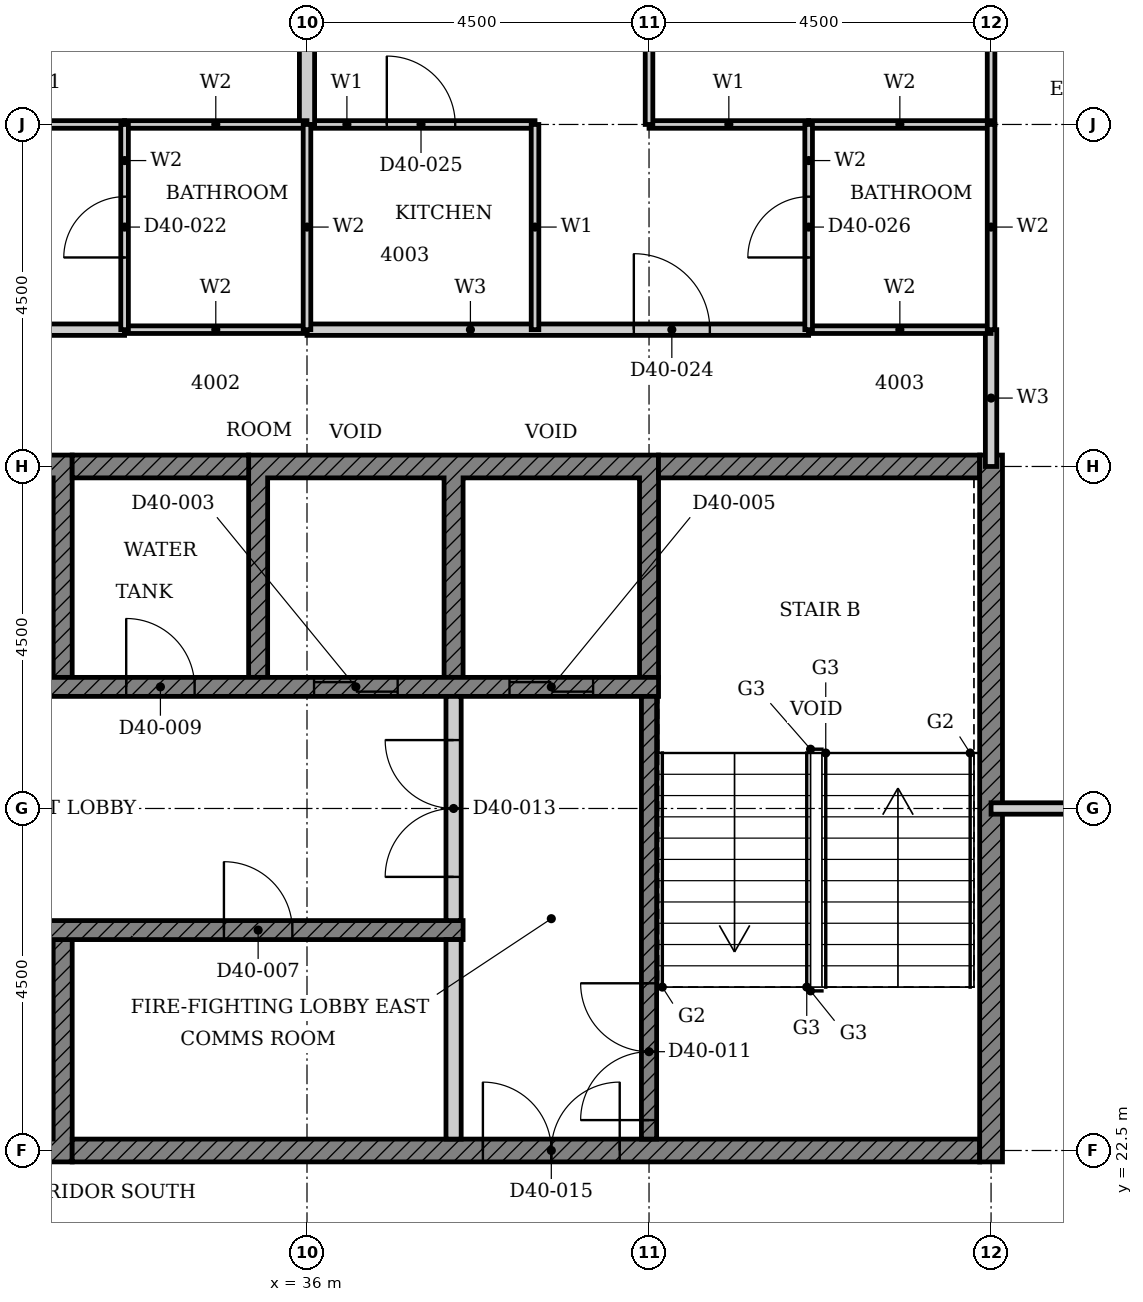
"""IFC4 building model, lengths in metres.
Left out: names, types, materials, properties, quantities, classifications, styles, units other than length and angle.
Written with IfcOpenShell. Run it as: python <this file> out.ifc"""

import sys

from ifc_helpers import new_model, si_unit, direction, frame, frame_2d, origin, place, context, subcontext, project, spatial, polyline, rectangle, outline, extrude, element, fill, save


model = new_model("IFC4")
c1 = context("Model", 3, precision=1e-05, world=origin(), true_north=direction((0.0, 1.0)))
c2 = subcontext(c1, "Body", "Model", "MODEL_VIEW")
j1 = project(units=[si_unit("LENGTHUNIT", "METRE"), si_unit("PLANEANGLEUNIT", "RADIAN")], contexts=[c1])
p1 = place(None, origin())
s1 = spatial("IfcSite", under=j1, at=p1, CompositionType="ELEMENT")
p2 = place(p1, origin())
s2 = spatial("IfcBuilding", under=s1, at=p2, CompositionType="ELEMENT")
p3 = place(p2, frame((0.0, 0.0, 161.7)))
s3 = spatial("IfcBuildingStorey", under=s2, at=p3, CompositionType="ELEMENT", Elevation=161.7)
p4 = place(p3, origin())
e1 = element("IfcWall", 1, at=p4, inside=s3, PredefinedType="SHEAR", context=c2, shape_type="SweptSolid", body=[
    extrude(outline(polyline([(27.518, 22.35), (32.911, 22.35), (32.911, 25.275), (32.661, 25.275), (32.661, 22.65), (30.339, 22.65), (30.339, 25.275), (30.089, 25.275), (30.089, 22.65), (27.768, 22.65), (27.768, 25.275), (27.518, 25.275), (27.518, 22.35)])), origin(), (0.0, 0.0, 1.0), 3.4),
])
p5 = place(p3, origin())
e2 = element("IfcWall", 2, at=p5, inside=s3, PredefinedType="SHEAR", context=c2, shape_type="SweptSolid", body=[
    extrude(outline(polyline([(27.518, 28.725), (27.768, 28.725), (27.768, 31.35), (30.089, 31.35), (30.089, 28.725), (30.339, 28.725), (30.339, 31.35), (32.661, 31.35), (32.661, 28.725), (32.911, 28.725), (32.911, 31.65), (27.518, 31.65), (27.518, 28.725)])), origin(), (0.0, 0.0, 1.0), 3.4),
])
p6 = place(p3, origin())
e3 = element("IfcWall", 3, at=p6, inside=s3, PredefinedType="SHEAR", context=c2, shape_type="SweptSolid", body=[
    extrude(outline(polyline([(35.232, 28.725), (35.482, 28.725), (35.482, 31.35), (37.803, 31.35), (37.803, 28.725), (38.053, 28.725), (38.053, 31.35), (40.375, 31.35), (40.375, 28.725), (40.625, 28.725), (40.625, 31.65), (35.232, 31.65), (35.232, 28.725)])), origin(), (0.0, 0.0, 1.0), 3.4),
])
p7 = place(p3, frame((32.911, 22.5, 0.0), z_axis=(0.0, 0.0, 1.0), x_axis=(1.0, 0.0, 0.0)))
e4 = element("IfcWall", 4, at=p7, inside=s3, PredefinedType="SHEAR", context=c2, shape_type="SweptSolid", body=[
    extrude(rectangle(XDim=11.939, YDim=0.3, at=frame_2d((5.97, 0.0))), origin(), (0.0, 0.0, 1.0), 3.4),
])
p8 = place(p7, frame((5.404, 0.0, 0.0)))
e5 = element("IfcOpeningElement", 5, at=p8, cuts=e4, PredefinedType="OPENING", context=c2, shape_type="SweptSolid", body=[
    extrude(rectangle(XDim=1.8, YDim=2.1, at=frame_2d((0.9, 1.05))), frame((0.0, 0.16, 0.0), z_axis=(0.0, -1.0, 0.0), x_axis=(1.0, 0.0, 0.0)), (0.0, 0.0, 1.0), 0.32),
])
p9 = place(p3, frame((32.911, 31.5, 0.0), z_axis=(0.0, 0.0, 1.0), x_axis=(1.0, 0.0, 0.0)))
e6 = element("IfcWall", 6, at=p9, inside=s3, PredefinedType="SHEAR", context=c2, shape_type="SweptSolid", body=[
    extrude(rectangle(XDim=2.322, YDim=0.3, at=frame_2d((1.161, 0.0))), origin(), (0.0, 0.0, 1.0), 3.4),
])
p10 = place(p3, frame((40.625, 31.5, 0.0), z_axis=(0.0, 0.0, 1.0), x_axis=(1.0, 0.0, 0.0)))
e7 = element("IfcWall", 7, at=p10, inside=s3, PredefinedType="SHEAR", context=c2, shape_type="SweptSolid", body=[
    extrude(rectangle(XDim=4.225, YDim=0.3, at=frame_2d((2.113, 0.0))), origin(), (0.0, 0.0, 1.0), 3.4),
])
p11 = place(p3, frame((45.0, 22.35, 0.0), z_axis=(0.0, 0.0, 1.0), x_axis=(0.0, 1.0, 0.0)))
e8 = element("IfcWall", 8, at=p11, inside=s3, PredefinedType="SHEAR", context=c2, shape_type="SweptSolid", body=[
    extrude(rectangle(XDim=9.3, YDim=0.3, at=frame_2d((4.65, 0.0))), origin(), (0.0, 0.0, 1.0), 3.4),
])
p12 = place(p3, frame((22.375, 25.4, 0.0), z_axis=(0.0, 0.0, 1.0), x_axis=(1.0, 0.0, 0.0)))
e9 = element("IfcWall", 9, at=p12, inside=s3, PredefinedType="SHEAR", context=c2, shape_type="SweptSolid", body=[
    extrude(rectangle(XDim=15.678, YDim=0.25, at=frame_2d((7.839, 0.0))), origin(), (0.0, 0.0, 1.0), 3.4),
])
p13 = place(p12, frame((8.575, 0.0, 0.0)))
e10 = element("IfcOpeningElement", 10, at=p13, cuts=e9, PredefinedType="OPENING", context=c2, shape_type="SweptSolid", body=[
    extrude(rectangle(XDim=1.1, YDim=2.1, at=frame_2d((0.55, 1.05))), frame((0.0, 0.135, 0.0), z_axis=(0.0, -1.0, 0.0), x_axis=(1.0, 0.0, 0.0)), (0.0, 0.0, 1.0), 0.27),
])
p14 = place(p12, frame((0.861, 0.0, 0.0)))
e11 = element("IfcOpeningElement", 11, at=p14, cuts=e9, PredefinedType="OPENING", context=c2, shape_type="SweptSolid", body=[
    extrude(rectangle(XDim=1.1, YDim=2.1, at=frame_2d((0.55, 1.05))), frame((0.0, 0.135, 0.0), z_axis=(0.0, -1.0, 0.0), x_axis=(1.0, 0.0, 0.0)), (0.0, 0.0, 1.0), 0.27),
])
p15 = place(p12, frame((3.532, 0.0, 0.0)))
e12 = element("IfcOpeningElement", 12, at=p15, cuts=e9, PredefinedType="OPENING", context=c2, shape_type="SweptSolid", body=[
    extrude(rectangle(XDim=0.9, YDim=2.1, at=frame_2d((0.45, 1.05))), frame((0.0, 0.135, 0.0), z_axis=(0.0, -1.0, 0.0), x_axis=(1.0, 0.0, 0.0)), (0.0, 0.0, 1.0), 0.27),
])
p16 = place(p12, frame((12.532, 0.0, 0.0)))
e13 = element("IfcOpeningElement", 13, at=p16, cuts=e9, PredefinedType="OPENING", context=c2, shape_type="SweptSolid", body=[
    extrude(rectangle(XDim=0.9, YDim=2.1, at=frame_2d((0.45, 1.05))), frame((0.0, 0.135, 0.0), z_axis=(0.0, -1.0, 0.0), x_axis=(1.0, 0.0, 0.0)), (0.0, 0.0, 1.0), 0.27),
])
p17 = place(p3, frame((24.947, 28.6, 0.0), z_axis=(0.0, 0.0, 1.0), x_axis=(1.0, 0.0, 0.0)))
e14 = element("IfcWall", 14, at=p17, inside=s3, PredefinedType="SHEAR", context=c2, shape_type="SweptSolid", body=[
    extrude(rectangle(XDim=15.678, YDim=0.25, at=frame_2d((7.839, 0.0))), origin(), (0.0, 0.0, 1.0), 3.4),
])
p18 = place(p17, frame((6.004, 0.0, 0.0)))
e15 = element("IfcOpeningElement", 15, at=p18, cuts=e14, PredefinedType="OPENING", context=c2, shape_type="SweptSolid", body=[
    extrude(rectangle(XDim=1.1, YDim=2.1, at=frame_2d((0.55, 1.05))), frame((0.0, 0.135, 0.0), z_axis=(0.0, -1.0, 0.0), x_axis=(1.0, 0.0, 0.0)), (0.0, 0.0, 1.0), 0.27),
])
p19 = place(p17, frame((11.146, 0.0, 0.0)))
e16 = element("IfcOpeningElement", 16, at=p19, cuts=e14, PredefinedType="OPENING", context=c2, shape_type="SweptSolid", body=[
    extrude(rectangle(XDim=1.1, YDim=2.1, at=frame_2d((0.55, 1.05))), frame((0.0, 0.135, 0.0), z_axis=(0.0, -1.0, 0.0), x_axis=(1.0, 0.0, 0.0)), (0.0, 0.0, 1.0), 0.27),
])
p20 = place(p17, frame((13.718, 0.0, 0.0)))
e17 = element("IfcOpeningElement", 17, at=p20, cuts=e14, PredefinedType="OPENING", context=c2, shape_type="SweptSolid", body=[
    extrude(rectangle(XDim=1.1, YDim=2.1, at=frame_2d((0.55, 1.05))), frame((0.0, 0.135, 0.0), z_axis=(0.0, -1.0, 0.0), x_axis=(1.0, 0.0, 0.0)), (0.0, 0.0, 1.0), 0.27),
])
p21 = place(p17, frame((0.961, 0.0, 0.0)))
e18 = element("IfcOpeningElement", 18, at=p21, cuts=e14, PredefinedType="OPENING", context=c2, shape_type="SweptSolid", body=[
    extrude(rectangle(XDim=0.9, YDim=2.1, at=frame_2d((0.45, 1.05))), frame((0.0, 0.135, 0.0), z_axis=(0.0, -1.0, 0.0), x_axis=(1.0, 0.0, 0.0)), (0.0, 0.0, 1.0), 0.27),
])
p22 = place(p17, frame((8.675, 0.0, 0.0)))
e19 = element("IfcOpeningElement", 19, at=p22, cuts=e14, PredefinedType="OPENING", context=c2, shape_type="SweptSolid", body=[
    extrude(rectangle(XDim=0.9, YDim=2.1, at=frame_2d((0.45, 1.05))), frame((0.0, 0.135, 0.0), z_axis=(0.0, -1.0, 0.0), x_axis=(1.0, 0.0, 0.0)), (0.0, 0.0, 1.0), 0.27),
])
p23 = place(p3, frame((37.928, 22.65, 0.0), z_axis=(0.0, 0.0, 1.0), x_axis=(0.0, 1.0, 0.0)))
e20 = element("IfcWall", 20, at=p23, inside=s3, PredefinedType="PARTITIONING", context=c2, shape_type="SweptSolid", body=[
    extrude(rectangle(XDim=2.625, YDim=0.2, at=frame_2d((1.312, 0.0))), origin(), (0.0, 0.0, 1.0), 3.4),
])
p24 = place(p3, frame((40.5, 22.65, 0.0), z_axis=(0.0, 0.0, 1.0), x_axis=(0.0, 1.0, 0.0)))
e21 = element("IfcWall", 21, at=p24, inside=s3, PredefinedType="SHEAR", context=c2, shape_type="SweptSolid", body=[
    extrude(rectangle(XDim=5.825, YDim=0.2, at=frame_2d((2.913, 0.0))), origin(), (0.0, 0.0, 1.0), 3.4),
])
p25 = place(p24, frame((0.25, 0.0, 0.0)))
e22 = element("IfcOpeningElement", 22, at=p25, cuts=e21, PredefinedType="OPENING", context=c2, shape_type="SweptSolid", body=[
    extrude(rectangle(XDim=1.8, YDim=2.1, at=frame_2d((0.9, 1.05))), frame((0.0, 0.11, 0.0), z_axis=(0.0, -1.0, 0.0), x_axis=(1.0, 0.0, 0.0)), (0.0, 0.0, 1.0), 0.22),
])
p26 = place(p3, frame((37.928, 25.525, 0.0), z_axis=(0.0, 0.0, 1.0), x_axis=(0.0, 1.0, 0.0)))
e23 = element("IfcWall", 23, at=p26, inside=s3, PredefinedType="PARTITIONING", context=c2, shape_type="SweptSolid", body=[
    extrude(rectangle(XDim=2.95, YDim=0.2, at=frame_2d((1.475, 0.0))), origin(), (0.0, 0.0, 1.0), 3.4),
])
p27 = place(p26, frame((0.575, 0.0, 0.0)))
e24 = element("IfcOpeningElement", 24, at=p27, cuts=e23, PredefinedType="OPENING", context=c2, shape_type="SweptSolid", body=[
    extrude(rectangle(XDim=1.8, YDim=2.1, at=frame_2d((0.9, 1.05))), frame((0.0, 0.11, 0.0), z_axis=(0.0, -1.0, 0.0), x_axis=(1.0, 0.0, 0.0)), (0.0, 0.0, 1.0), 0.22),
])
p28 = place(p3, frame((45.0, 27.0, 0.0), z_axis=(0.0, 0.0, 1.0), x_axis=(1.0, 0.0, 0.0)))
e25 = element("IfcWall", 25, at=p28, inside=s3, PredefinedType="PARTITIONING", context=c2, shape_type="SweptSolid", body=[
    extrude(rectangle(XDim=13.5, YDim=0.15, at=frame_2d((6.75, 0.0))), origin(), (0.0, 0.0, 1.0), 2.68),
])
p29 = place(p28, frame((7.15, 0.0, 0.0)))
e26 = element("IfcOpeningElement", 26, at=p29, cuts=e25, PredefinedType="OPENING", context=c2, shape_type="SweptSolid", body=[
    extrude(rectangle(XDim=1.0, YDim=2.1, at=frame_2d((0.5, 1.05))), frame((0.0, 0.085, 0.0), z_axis=(0.0, -1.0, 0.0), x_axis=(1.0, 0.0, 0.0)), (0.0, 0.0, 1.0), 0.17),
])
p30 = place(p3, frame((27.0, 33.3, 0.0), z_axis=(0.0, 0.0, 1.0), x_axis=(1.0, 0.0, 0.0)))
e27 = element("IfcWall", 27, at=p30, inside=s3, PredefinedType="PARTITIONING", context=c2, shape_type="SweptSolid", body=[
    extrude(rectangle(XDim=6.6, YDim=0.15, at=frame_2d((3.3, 0.0))), origin(), (0.0, 0.0, 1.0), 3.4),
])
p31 = place(p30, frame((4.3, 0.0, 0.0)))
e28 = element("IfcOpeningElement", 28, at=p31, cuts=e27, PredefinedType="OPENING", context=c2, shape_type="SweptSolid", body=[
    extrude(rectangle(XDim=1.0, YDim=2.2, at=frame_2d((0.5, 1.1))), frame((0.0, 0.085, 0.0), z_axis=(0.0, -1.0, 0.0), x_axis=(1.0, 0.0, 0.0)), (0.0, 0.0, 1.0), 0.17),
])
p32 = place(p3, frame((36.0, 33.3, 0.0), z_axis=(0.0, 0.0, 1.0), x_axis=(1.0, 0.0, 0.0)))
e29 = element("IfcWall", 29, at=p32, inside=s3, PredefinedType="PARTITIONING", context=c2, shape_type="SweptSolid", body=[
    extrude(rectangle(XDim=6.6, YDim=0.15, at=frame_2d((3.3, 0.0))), origin(), (0.0, 0.0, 1.0), 3.4),
])
p33 = place(p32, frame((4.3, 0.0, 0.0)))
e30 = element("IfcOpeningElement", 30, at=p33, cuts=e29, PredefinedType="OPENING", context=c2, shape_type="SweptSolid", body=[
    extrude(rectangle(XDim=1.0, YDim=2.2, at=frame_2d((0.5, 1.1))), frame((0.0, 0.085, 0.0), z_axis=(0.0, -1.0, 0.0), x_axis=(1.0, 0.0, 0.0)), (0.0, 0.0, 1.0), 0.17),
])
p34 = place(p3, frame((45.0, 31.5, 0.0), z_axis=(0.0, 0.0, 1.0), x_axis=(0.0, 1.0, 0.0)))
e31 = element("IfcWall", 31, at=p34, inside=s3, PredefinedType="PARTITIONING", context=c2, shape_type="SweptSolid", body=[
    extrude(rectangle(XDim=1.8, YDim=0.15, at=frame_2d((0.9, 0.0))), origin(), (0.0, 0.0, 1.0), 3.4),
])
for number, where, z_axis, x_axis in (
    (32, (31.5, 36.0, 0.0), (0.0, 0.0, 1.0), (1.0, 0.0, 0.0)),
    (33, (40.5, 36.0, 0.0), (0.0, 0.0, 1.0), (1.0, 0.0, 0.0)),
):
    element("IfcWall", number, at=place(p3, frame(where, z_axis=z_axis, x_axis=x_axis)), inside=s3, PredefinedType="PARTITIONING", context=c2, shape_type="SweptSolid", body=[
        extrude(rectangle(XDim=2.1, YDim=0.1, at=frame_2d((1.05, 0.0))), origin(), (0.0, 0.0, 1.0), 3.4),
    ])
p35 = place(p3, frame((36.0, 36.0, 0.0), z_axis=(0.0, 0.0, 1.0), x_axis=(1.0, 0.0, 0.0)))
e34 = element("IfcWall", 34, at=p35, inside=s3, PredefinedType="PARTITIONING", context=c2, shape_type="SweptSolid", body=[
    extrude(rectangle(XDim=3.0, YDim=0.1, at=frame_2d((1.5, 0.0))), origin(), (0.0, 0.0, 1.0), 3.4),
])
p36 = place(p35, frame((1.05, 0.0, 0.0)))
e35 = element("IfcOpeningElement", 35, at=p36, cuts=e34, PredefinedType="OPENING", context=c2, shape_type="SweptSolid", body=[
    extrude(rectangle(XDim=0.9, YDim=2.1, at=frame_2d((0.45, 1.05))), frame((0.0, 0.06, 0.0), z_axis=(0.0, -1.0, 0.0), x_axis=(1.0, 0.0, 0.0)), (0.0, 0.0, 1.0), 0.12),
])
p37 = place(p3, frame((39.0, 33.3, 0.0), z_axis=(0.0, 0.0, 1.0), x_axis=(0.0, 1.0, 0.0)))
e36 = element("IfcWall", 36, at=p37, inside=s3, PredefinedType="PARTITIONING", context=c2, shape_type="SweptSolid", body=[
    extrude(rectangle(XDim=2.7, YDim=0.1, at=frame_2d((1.35, 0.0))), origin(), (0.0, 0.0, 1.0), 3.4),
])
p38 = place(p3, frame((40.5, 36.0, 0.0), z_axis=(0.0, 0.0, 1.0), x_axis=(0.0, 1.0, 0.0)))
e37 = element("IfcWall", 37, at=p38, inside=s3, PredefinedType="PARTITIONING", context=c2, shape_type="SweptSolid", body=[
    extrude(rectangle(XDim=4.84, YDim=0.1, at=frame_2d((2.42, 0.0))), origin(), (0.0, 0.0, 1.0), 3.4),
])
p39 = place(p38, frame((1.8, 0.0, 0.0)))
e38 = element("IfcOpeningElement", 38, at=p39, cuts=e37, PredefinedType="OPENING", context=c2, shape_type="SweptSolid", body=[
    extrude(rectangle(XDim=0.9, YDim=2.1, at=frame_2d((0.45, 1.05))), frame((0.0, 0.06, 0.0), z_axis=(0.0, -1.0, 0.0), x_axis=(1.0, 0.0, 0.0)), (0.0, 0.0, 1.0), 0.12),
])
p40 = place(p3, frame((45.0, 36.001, 0.0), z_axis=(0.0, 0.0, 1.0), x_axis=(0.0, 1.0, 0.0)))
e39 = element("IfcWall", 39, at=p40, inside=s3, PredefinedType="PARTITIONING", context=c2, shape_type="SweptSolid", body=[
    extrude(rectangle(XDim=2.439, YDim=0.1, at=frame_2d((1.219, 0.0))), origin(), (0.0, 0.0, 1.0), 3.4),
])
p41 = place(p3, frame((36.0, 36.0, 0.0), z_axis=(0.0, 0.0, 1.0), x_axis=(0.0, 1.0, 0.0)))
e40 = element("IfcWall", 40, at=p41, inside=s3, PredefinedType="PARTITIONING", context=c2, shape_type="SweptSolid", body=[
    extrude(rectangle(XDim=4.69, YDim=0.2, at=frame_2d((2.345, 0.0))), origin(), (0.0, 0.0, 1.0), 3.4),
])
for number, where, z_axis, x_axis in (
    (41, (33.6, 33.3, 0.0), (0.0, 0.0, 1.0), (1.0, 0.0, 0.0)),
    (42, (42.6, 33.3, 0.0), (0.0, 0.0, 1.0), (1.0, 0.0, 0.0)),
    (43, (33.6, 36.0, 0.0), (0.0, 0.0, 1.0), (1.0, 0.0, 0.0)),
    (44, (42.6, 36.0, 0.0), (0.0, 0.0, 1.0), (1.0, 0.0, 0.0)),
):
    element("IfcWall", number, at=place(p3, frame(where, z_axis=z_axis, x_axis=x_axis)), inside=s3, PredefinedType="PARTITIONING", context=c2, shape_type="SweptSolid", body=[
        extrude(rectangle(XDim=2.4, YDim=0.1, at=frame_2d((1.2, 0.0))), origin(), (0.0, 0.0, 1.0), 3.4),
    ])
p42 = place(p3, frame((33.6, 33.3, 0.0), z_axis=(0.0, 0.0, 1.0), x_axis=(0.0, 1.0, 0.0)))
e45 = element("IfcWall", 45, at=p42, inside=s3, PredefinedType="PARTITIONING", context=c2, shape_type="SweptSolid", body=[
    extrude(rectangle(XDim=2.7, YDim=0.1, at=frame_2d((1.35, 0.0))), origin(), (0.0, 0.0, 1.0), 3.4),
])
p43 = place(p42, frame((0.95, 0.0, 0.0)))
e46 = element("IfcOpeningElement", 46, at=p43, cuts=e45, PredefinedType="OPENING", context=c2, shape_type="SweptSolid", body=[
    extrude(rectangle(XDim=0.8, YDim=2.1, at=frame_2d((0.4, 1.05))), frame((0.0, 0.06, 0.0), z_axis=(0.0, -1.0, 0.0), x_axis=(1.0, 0.0, 0.0)), (0.0, 0.0, 1.0), 0.12),
])
p44 = place(p3, frame((36.0, 33.3, 0.0), z_axis=(0.0, 0.0, 1.0), x_axis=(0.0, 1.0, 0.0)))
e47 = element("IfcWall", 47, at=p44, inside=s3, PredefinedType="PARTITIONING", context=c2, shape_type="SweptSolid", body=[
    extrude(rectangle(XDim=2.7, YDim=0.1, at=frame_2d((1.35, 0.0))), origin(), (0.0, 0.0, 1.0), 3.4),
])
p45 = place(p3, frame((42.6, 33.3, 0.0), z_axis=(0.0, 0.0, 1.0), x_axis=(0.0, 1.0, 0.0)))
e48 = element("IfcWall", 48, at=p45, inside=s3, PredefinedType="PARTITIONING", context=c2, shape_type="SweptSolid", body=[
    extrude(rectangle(XDim=2.7, YDim=0.1, at=frame_2d((1.35, 0.0))), origin(), (0.0, 0.0, 1.0), 3.4),
])
p46 = place(p45, frame((0.95, 0.0, 0.0)))
e49 = element("IfcOpeningElement", 49, at=p46, cuts=e48, PredefinedType="OPENING", context=c2, shape_type="SweptSolid", body=[
    extrude(rectangle(XDim=0.8, YDim=2.1, at=frame_2d((0.4, 1.05))), frame((0.0, 0.06, 0.0), z_axis=(0.0, -1.0, 0.0), x_axis=(1.0, 0.0, 0.0)), (0.0, 0.0, 1.0), 0.12),
])
p47 = place(p3, frame((45.0, 33.3, 0.0), z_axis=(0.0, 0.0, 1.0), x_axis=(0.0, 1.0, 0.0)))
e50 = element("IfcWall", 50, at=p47, inside=s3, PredefinedType="PARTITIONING", context=c2, shape_type="SweptSolid", body=[
    extrude(rectangle(XDim=2.7, YDim=0.1, at=frame_2d((1.35, 0.0))), origin(), (0.0, 0.0, 1.0), 3.4),
])
p48 = place(p19, origin())
e51 = element("IfcDoor", 51, at=p48, inside=s3, OperationType="DOUBLE_DOOR_SLIDING", PredefinedType="DOOR", context=c2, shape_type="SweptSolid", body=[
    extrude(rectangle(XDim=1.1, YDim=2.1, at=frame_2d((0.55, 1.05))), frame((0.0, 0.025, 0.0), z_axis=(0.0, -1.0, 0.0), x_axis=(1.0, 0.0, 0.0)), (0.0, 0.0, 1.0), 0.05),
])
fill(e16, e51)
p49 = place(p20, origin())
e52 = element("IfcDoor", 52, at=p49, inside=s3, OperationType="DOUBLE_DOOR_SLIDING", PredefinedType="DOOR", context=c2, shape_type="SweptSolid", body=[
    extrude(rectangle(XDim=1.1, YDim=2.1, at=frame_2d((0.55, 1.05))), frame((0.0, 0.025, 0.0), z_axis=(0.0, -1.0, 0.0), x_axis=(1.0, 0.0, 0.0)), (0.0, 0.0, 1.0), 0.05),
])
fill(e17, e52)
p50 = place(p16, origin())
e53 = element("IfcDoor", 53, at=p50, inside=s3, OperationType="SINGLE_SWING_LEFT", PredefinedType="DOOR", context=c2, shape_type="SweptSolid", body=[
    extrude(rectangle(XDim=0.9, YDim=2.1, at=frame_2d((0.45, 1.05))), frame((0.0, 0.025, 0.0), z_axis=(0.0, -1.0, 0.0), x_axis=(1.0, 0.0, 0.0)), (0.0, 0.0, 1.0), 0.05),
])
fill(e13, e53)
p51 = place(p22, origin())
e54 = element("IfcDoor", 54, at=p51, inside=s3, OperationType="SINGLE_SWING_LEFT", PredefinedType="DOOR", context=c2, shape_type="SweptSolid", body=[
    extrude(rectangle(XDim=0.9, YDim=2.1, at=frame_2d((0.45, 1.05))), frame((0.0, 0.025, 0.0), z_axis=(0.0, -1.0, 0.0), x_axis=(1.0, 0.0, 0.0)), (0.0, 0.0, 1.0), 0.05),
])
fill(e19, e54)
p52 = place(p25, origin())
e55 = element("IfcDoor", 55, at=p52, inside=s3, OperationType="DOUBLE_DOOR_SINGLE_SWING", PredefinedType="DOOR", context=c2, shape_type="SweptSolid", body=[
    extrude(rectangle(XDim=1.8, YDim=2.1, at=frame_2d((0.9, 1.05))), frame((0.0, 0.025, 0.0), z_axis=(0.0, -1.0, 0.0), x_axis=(1.0, 0.0, 0.0)), (0.0, 0.0, 1.0), 0.05),
])
fill(e22, e55)
p53 = place(p27, origin())
e56 = element("IfcDoor", 56, at=p53, inside=s3, OperationType="DOUBLE_DOOR_SINGLE_SWING", PredefinedType="DOOR", context=c2, shape_type="SweptSolid", body=[
    extrude(rectangle(XDim=1.8, YDim=2.1, at=frame_2d((0.9, 1.05))), frame((0.0, 0.025, 0.0), z_axis=(0.0, -1.0, 0.0), x_axis=(1.0, 0.0, 0.0)), (0.0, 0.0, 1.0), 0.05),
])
fill(e24, e56)
p54 = place(p8, origin())
e57 = element("IfcDoor", 57, at=p54, inside=s3, OperationType="DOUBLE_DOOR_SINGLE_SWING", PredefinedType="DOOR", context=c2, shape_type="SweptSolid", body=[
    extrude(rectangle(XDim=1.8, YDim=2.1, at=frame_2d((0.9, 1.05))), frame((0.0, 0.025, 0.0), z_axis=(0.0, -1.0, 0.0), x_axis=(1.0, 0.0, 0.0)), (0.0, 0.0, 1.0), 0.05),
])
fill(e5, e57)
p55 = place(p43, origin())
e58 = element("IfcDoor", 58, at=p55, inside=s3, OperationType="SINGLE_SWING_LEFT", PredefinedType="DOOR", context=c2, shape_type="SweptSolid", body=[
    extrude(rectangle(XDim=0.8, YDim=2.1, at=frame_2d((0.4, 1.05))), frame((0.0, 0.025, 0.0), z_axis=(0.0, -1.0, 0.0), x_axis=(1.0, 0.0, 0.0)), (0.0, 0.0, 1.0), 0.05),
])
fill(e46, e58)
p56 = place(p33, origin())
e59 = element("IfcDoor", 59, at=p56, inside=s3, OperationType="SINGLE_SWING_RIGHT", PredefinedType="DOOR", context=c2, shape_type="SweptSolid", body=[
    extrude(rectangle(XDim=1.0, YDim=2.2, at=frame_2d((0.5, 1.1))), frame((0.0, 0.025, 0.0), z_axis=(0.0, -1.0, 0.0), x_axis=(1.0, 0.0, 0.0)), (0.0, 0.0, 1.0), 0.05),
])
fill(e30, e59)
p57 = place(p36, origin())
e60 = element("IfcDoor", 60, at=p57, inside=s3, OperationType="SINGLE_SWING_LEFT", PredefinedType="DOOR", context=c2, shape_type="SweptSolid", body=[
    extrude(rectangle(XDim=0.9, YDim=2.1, at=frame_2d((0.45, 1.05))), frame((0.0, 0.025, 0.0), z_axis=(0.0, -1.0, 0.0), x_axis=(1.0, 0.0, 0.0)), (0.0, 0.0, 1.0), 0.05),
])
fill(e35, e60)
p58 = place(p46, origin())
e61 = element("IfcDoor", 61, at=p58, inside=s3, OperationType="SINGLE_SWING_LEFT", PredefinedType="DOOR", context=c2, shape_type="SweptSolid", body=[
    extrude(rectangle(XDim=0.8, YDim=2.1, at=frame_2d((0.4, 1.05))), frame((0.0, 0.025, 0.0), z_axis=(0.0, -1.0, 0.0), x_axis=(1.0, 0.0, 0.0)), (0.0, 0.0, 1.0), 0.05),
])
fill(e49, e61)
save(model, sys.argv[1])
